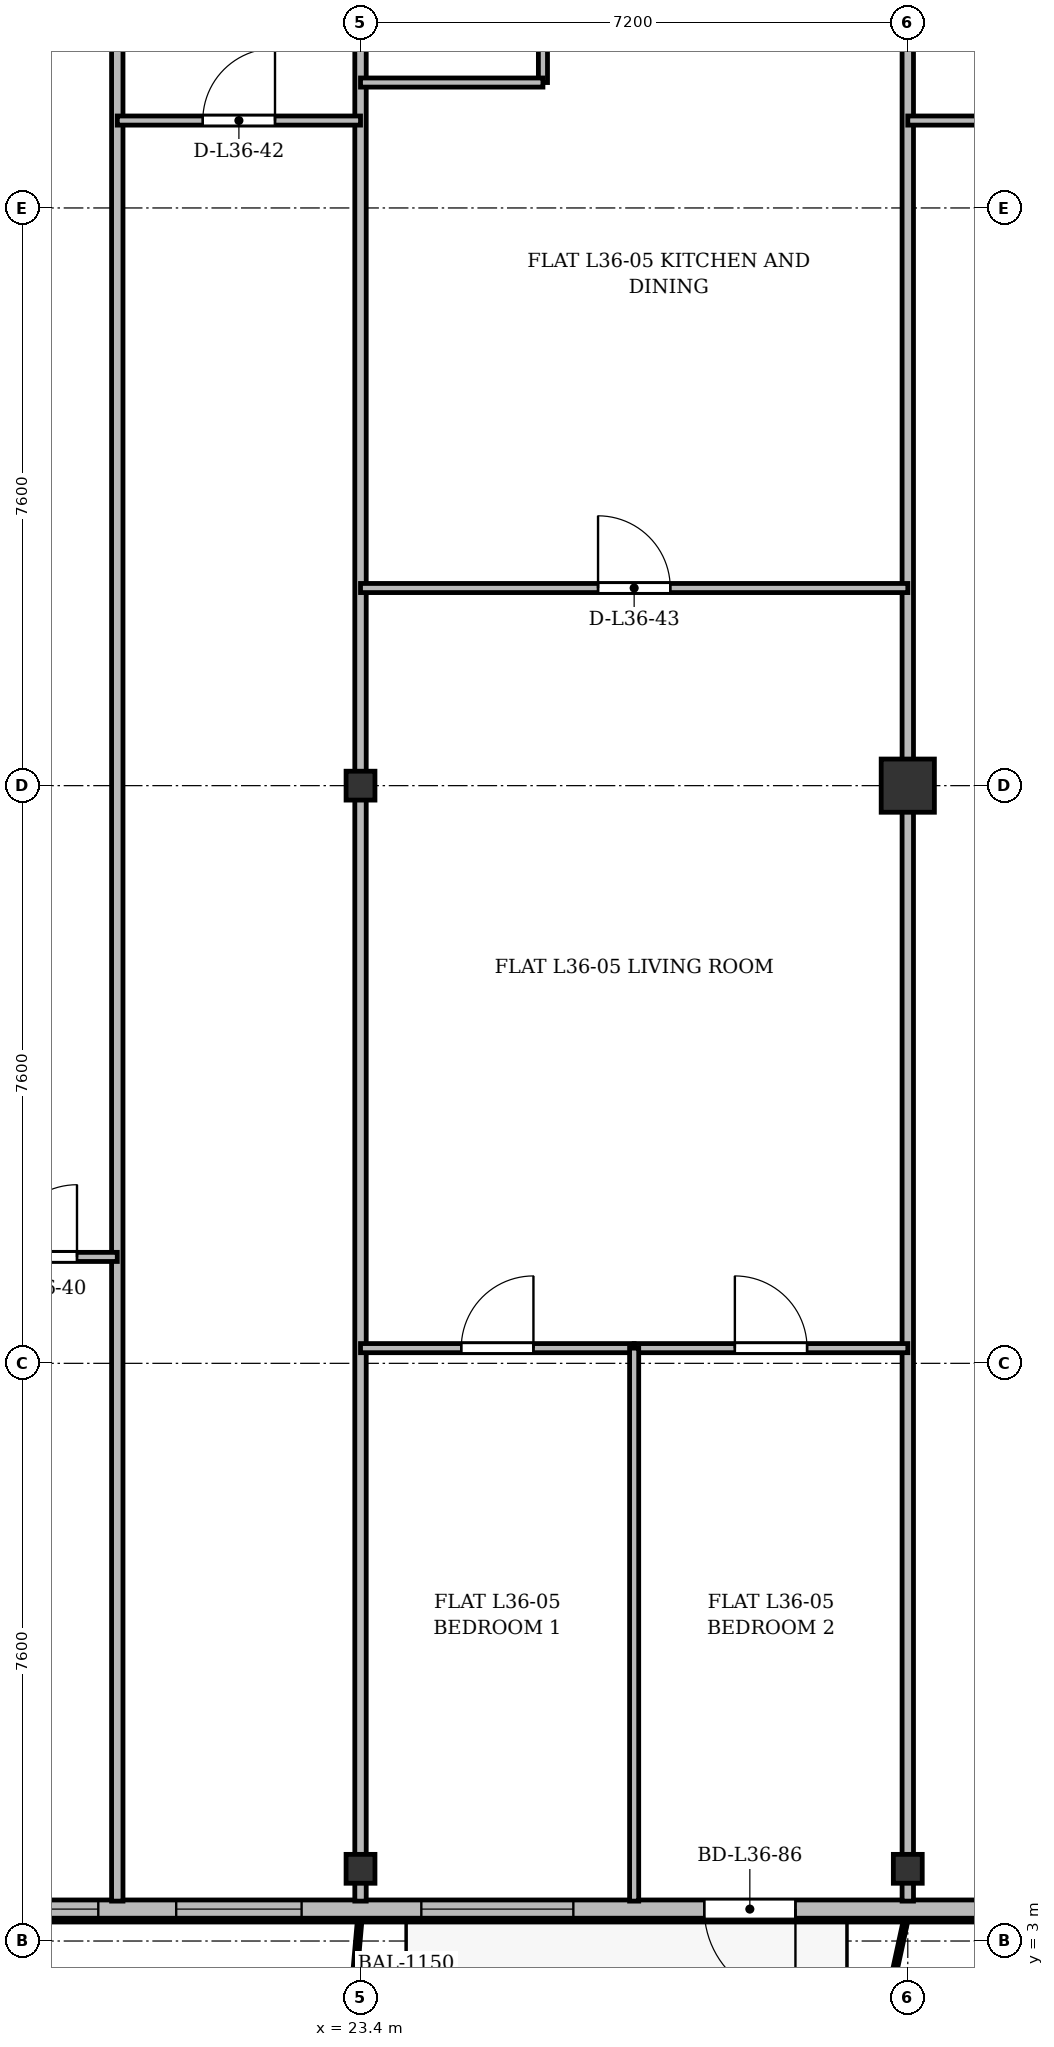
"""IFC4 building model, lengths in metres.
Left out: names, types, materials, properties, quantities, classifications, styles, units other than length and angle.
Written with IfcOpenShell. Run it as: python <this file> out.ifc"""

import sys

from ifc_helpers import new_model, si_unit, direction, frame, frame_2d, origin, origin_2d, place, context, subcontext, project, spatial, rectangle, i_section, extrude, source, transform, mapped, element, fill, save


model = new_model("IFC4")
c1 = context("Model", 3, precision=1e-05, world=origin(), true_north=direction((0.0, 1.0)))
c2 = subcontext(c1, "Body", "Model", "MODEL_VIEW")
j1 = project(units=[si_unit("LENGTHUNIT", "METRE"), si_unit("PLANEANGLEUNIT", "RADIAN")], contexts=[c1])
p1 = place(None, origin())
s1 = spatial("IfcSite", under=j1, at=p1, CompositionType="ELEMENT")
p2 = place(p1, origin())
s2 = spatial("IfcBuilding", under=s1, at=p2, CompositionType="ELEMENT")
p3 = place(p2, frame((0.0, 0.0, 139.3)))
s3 = spatial("IfcBuildingStorey", under=s2, at=p3, CompositionType="ELEMENT", Elevation=139.3)
m1 = source(origin(), c2, "Body", "SweptSolid", [
    extrude(i_section(OverallWidth=0.38, OverallDepth=0.38, WebThickness=0.02, FlangeThickness=0.03, at=origin_2d()), origin(), (0.0, 0.0, 1.0), 3.6),
])
for number, where, z_axis, x_axis in (
    (1, (23.4, 3.95, 0.0), (0.0, 0.0, 1.0), (1.0, 0.0, 0.0)),
    (2, (23.4, 18.2, 0.0), (0.0, 0.0, 1.0), (1.0, 0.0, 0.0)),
    (3, (30.6, 3.95, 0.0), (0.0, 0.0, 1.0), (1.0, 0.0, 0.0)),
):
    element("IfcColumn", number, at=place(p3, frame(where, z_axis=z_axis, x_axis=x_axis)), inside=s3, PredefinedType="COLUMN", context=c2, shape_type="MappedRepresentation", body=[
        mapped(m1, transform((0.0, 0.0, 0.0), x_axis=(1.0, 0.0, 0.0), y_axis=(0.0, 1.0, 0.0), z_axis=(0.0, 0.0, 1.0), scale=1.0)),
    ])
m2 = source(origin(), c2, "Body", "SweptSolid", [
    extrude(rectangle(XDim=0.7, YDim=0.7, at=origin_2d()), origin(), (0.0, 0.0, 1.0), 3.6),
])
p4 = place(p3, frame((30.6, 18.2, 0.0), z_axis=(0.0, 0.0, 1.0), x_axis=(1.0, 0.0, 0.0)))
e4 = element("IfcColumn", 4, at=p4, inside=s3, PredefinedType="COLUMN", context=c2, shape_type="MappedRepresentation", body=[
    mapped(m2, transform((0.0, 0.0, 0.0), x_axis=(1.0, 0.0, 0.0), y_axis=(0.0, 1.0, 0.0), z_axis=(0.0, 0.0, 1.0), scale=1.0)),
])
p5 = place(p3, frame((63.6, 3.42, 0.0), z_axis=(0.0, 0.0, 1.0), x_axis=(-1.0, 0.0, 0.0)))
e5 = element("IfcWall", 5, at=p5, inside=s3, PredefinedType="SOLIDWALL", context=c2, shape_type="SweptSolid", body=[
    extrude(rectangle(XDim=52.8, YDim=0.24, at=frame_2d((26.4, 0.0))), origin(), (0.0, 0.0, 1.0), 3.35),
])
p6 = place(p5, frame((0.495, 0.0, 0.9)))
e6 = element("IfcOpeningElement", 6, at=p6, cuts=e5, PredefinedType="OPENING", context=c2, shape_type="SweptSolid", body=[
    extrude(rectangle(XDim=1.5, YDim=1.75, at=frame_2d((0.75, 0.875))), frame((0.0, 0.13, 0.0), z_axis=(0.0, -1.0, 0.0), x_axis=(1.0, 0.0, 0.0)), (0.0, 0.0, 1.0), 0.26),
])
p7 = place(p5, frame((2.9, 0.0, 0.9)))
e7 = element("IfcOpeningElement", 7, at=p7, cuts=e5, PredefinedType="OPENING", context=c2, shape_type="SweptSolid", body=[
    extrude(rectangle(XDim=1.5, YDim=1.75, at=frame_2d((0.75, 0.875))), frame((0.0, 0.13, 0.0), z_axis=(0.0, -1.0, 0.0), x_axis=(1.0, 0.0, 0.0)), (0.0, 0.0, 1.0), 0.26),
])
p8 = place(p5, frame((5.902, 0.0, 0.0)))
e8 = element("IfcOpeningElement", 8, at=p8, cuts=e5, PredefinedType="OPENING", context=c2, shape_type="SweptSolid", body=[
    extrude(rectangle(XDim=1.2, YDim=2.2, at=frame_2d((0.6, 1.1))), frame((0.0, 0.13, 0.0), z_axis=(0.0, -1.0, 0.0), x_axis=(1.0, 0.0, 0.0)), (0.0, 0.0, 1.0), 0.26),
])
p9 = place(p5, frame((7.65, 0.0, 0.9)))
e9 = element("IfcOpeningElement", 9, at=p9, cuts=e5, PredefinedType="OPENING", context=c2, shape_type="SweptSolid", body=[
    extrude(rectangle(XDim=1.5, YDim=1.75, at=frame_2d((0.75, 0.875))), frame((0.0, 0.13, 0.0), z_axis=(0.0, -1.0, 0.0), x_axis=(1.0, 0.0, 0.0)), (0.0, 0.0, 1.0), 0.26),
])
p10 = place(p5, frame((10.1, 0.0, 0.9)))
e10 = element("IfcOpeningElement", 10, at=p10, cuts=e5, PredefinedType="OPENING", context=c2, shape_type="SweptSolid", body=[
    extrude(rectangle(XDim=1.8, YDim=1.8, at=frame_2d((0.9, 0.9))), frame((0.0, 0.13, 0.0), z_axis=(0.0, -1.0, 0.0), x_axis=(1.0, 0.0, 0.0)), (0.0, 0.0, 1.0), 0.26),
])
p11 = place(p5, frame((13.05, 0.0, 0.9)))
e11 = element("IfcOpeningElement", 11, at=p11, cuts=e5, PredefinedType="OPENING", context=c2, shape_type="SweptSolid", body=[
    extrude(rectangle(XDim=1.5, YDim=1.75, at=frame_2d((0.75, 0.875))), frame((0.0, 0.13, 0.0), z_axis=(0.0, -1.0, 0.0), x_axis=(1.0, 0.0, 0.0)), (0.0, 0.0, 1.0), 0.26),
])
p12 = place(p5, frame((15.45, 0.0, 0.9)))
e12 = element("IfcOpeningElement", 12, at=p12, cuts=e5, PredefinedType="OPENING", context=c2, shape_type="SweptSolid", body=[
    extrude(rectangle(XDim=1.5, YDim=1.75, at=frame_2d((0.75, 0.875))), frame((0.0, 0.13, 0.0), z_axis=(0.0, -1.0, 0.0), x_axis=(1.0, 0.0, 0.0)), (0.0, 0.0, 1.0), 0.26),
])
p13 = place(p5, frame((17.6, 0.0, 0.9)))
e13 = element("IfcOpeningElement", 13, at=p13, cuts=e5, PredefinedType="OPENING", context=c2, shape_type="SweptSolid", body=[
    extrude(rectangle(XDim=2.0, YDim=1.95, at=frame_2d((1.0, 0.975))), frame((0.0, 0.13, 0.0), z_axis=(0.0, -1.0, 0.0), x_axis=(1.0, 0.0, 0.0)), (0.0, 0.0, 1.0), 0.26),
])
p14 = place(p5, frame((20.625, 0.0, 0.9)))
e14 = element("IfcOpeningElement", 14, at=p14, cuts=e5, PredefinedType="OPENING", context=c2, shape_type="SweptSolid", body=[
    extrude(rectangle(XDim=1.65, YDim=1.85, at=frame_2d((0.825, 0.925))), frame((0.0, 0.13, 0.0), z_axis=(0.0, -1.0, 0.0), x_axis=(1.0, 0.0, 0.0)), (0.0, 0.0, 1.0), 0.26),
])
p15 = place(p5, frame((23.85, 0.0, 0.9)))
e15 = element("IfcOpeningElement", 15, at=p15, cuts=e5, PredefinedType="OPENING", context=c2, shape_type="SweptSolid", body=[
    extrude(rectangle(XDim=1.8, YDim=1.8, at=frame_2d((0.9, 0.9))), frame((0.0, 0.13, 0.0), z_axis=(0.0, -1.0, 0.0), x_axis=(1.0, 0.0, 0.0)), (0.0, 0.0, 1.0), 0.26),
])
p16 = place(p5, frame((28.6, 0.0, 0.9)))
e16 = element("IfcOpeningElement", 16, at=p16, cuts=e5, PredefinedType="OPENING", context=c2, shape_type="SweptSolid", body=[
    extrude(rectangle(XDim=2.2, YDim=1.8, at=frame_2d((1.1, 0.9))), frame((0.0, 0.13, 0.0), z_axis=(0.0, -1.0, 0.0), x_axis=(1.0, 0.0, 0.0)), (0.0, 0.0, 1.0), 0.26),
])
p17 = place(p5, frame((34.478, 0.0, 0.0)))
e17 = element("IfcOpeningElement", 17, at=p17, cuts=e5, PredefinedType="OPENING", context=c2, shape_type="SweptSolid", body=[
    extrude(rectangle(XDim=1.2, YDim=2.2, at=frame_2d((0.6, 1.1))), frame((0.0, 0.13, 0.0), z_axis=(0.0, -1.0, 0.0), x_axis=(1.0, 0.0, 0.0)), (0.0, 0.0, 1.0), 0.26),
])
p18 = place(p5, frame((37.4, 0.0, 0.9)))
e18 = element("IfcOpeningElement", 18, at=p18, cuts=e5, PredefinedType="OPENING", context=c2, shape_type="SweptSolid", body=[
    extrude(rectangle(XDim=2.0, YDim=1.95, at=frame_2d((1.0, 0.975))), frame((0.0, 0.13, 0.0), z_axis=(0.0, -1.0, 0.0), x_axis=(1.0, 0.0, 0.0)), (0.0, 0.0, 1.0), 0.26),
])
p19 = place(p5, frame((40.975, 0.0, 0.9)))
e19 = element("IfcOpeningElement", 19, at=p19, cuts=e5, PredefinedType="OPENING", context=c2, shape_type="SweptSolid", body=[
    extrude(rectangle(XDim=1.65, YDim=1.85, at=frame_2d((0.825, 0.925))), frame((0.0, 0.13, 0.0), z_axis=(0.0, -1.0, 0.0), x_axis=(1.0, 0.0, 0.0)), (0.0, 0.0, 1.0), 0.26),
])
p20 = place(p5, frame((43.65, 0.0, 0.9)))
e20 = element("IfcOpeningElement", 20, at=p20, cuts=e5, PredefinedType="OPENING", context=c2, shape_type="SweptSolid", body=[
    extrude(rectangle(XDim=1.5, YDim=1.75, at=frame_2d((0.75, 0.875))), frame((0.0, 0.13, 0.0), z_axis=(0.0, -1.0, 0.0), x_axis=(1.0, 0.0, 0.0)), (0.0, 0.0, 1.0), 0.26),
])
p21 = place(p5, frame((45.85, 0.0, 0.9)))
e21 = element("IfcOpeningElement", 21, at=p21, cuts=e5, PredefinedType="OPENING", context=c2, shape_type="SweptSolid", body=[
    extrude(rectangle(XDim=1.5, YDim=1.75, at=frame_2d((0.75, 0.875))), frame((0.0, 0.13, 0.0), z_axis=(0.0, -1.0, 0.0), x_axis=(1.0, 0.0, 0.0)), (0.0, 0.0, 1.0), 0.26),
])
p22 = place(p5, frame((48.25, 0.0, 0.9)))
e22 = element("IfcOpeningElement", 22, at=p22, cuts=e5, PredefinedType="OPENING", context=c2, shape_type="SweptSolid", body=[
    extrude(rectangle(XDim=1.5, YDim=1.75, at=frame_2d((0.75, 0.875))), frame((0.0, 0.13, 0.0), z_axis=(0.0, -1.0, 0.0), x_axis=(1.0, 0.0, 0.0)), (0.0, 0.0, 1.0), 0.26),
])
p23 = place(p5, frame((50.455, 0.0, 0.9)))
e23 = element("IfcOpeningElement", 23, at=p23, cuts=e5, PredefinedType="OPENING", context=c2, shape_type="SweptSolid", body=[
    extrude(rectangle(XDim=2.0, YDim=1.95, at=frame_2d((1.0, 0.975))), frame((0.0, 0.13, 0.0), z_axis=(0.0, -1.0, 0.0), x_axis=(1.0, 0.0, 0.0)), (0.0, 0.0, 1.0), 0.26),
])
for number, where, z_axis, x_axis in (
    (24, (23.4, 3.525, 0.0), (0.0, 0.0, 1.0), (0.0, 1.0, 0.0)),
    (25, (30.6, 3.525, 0.0), (0.0, 0.0, 1.0), (0.0, 1.0, 0.0)),
):
    element("IfcWall", number, at=place(p3, frame(where, z_axis=z_axis, x_axis=x_axis)), inside=s3, PredefinedType="PARTITIONING", context=c2, shape_type="SweptSolid", body=[
        extrude(rectangle(XDim=27.275, YDim=0.15, at=frame_2d((13.638, 0.0))), origin(), (0.0, 0.0, 1.0), 2.85),
    ])
p24 = place(p3, frame((20.2, 3.525, 0.0), z_axis=(0.0, 0.0, 1.0), x_axis=(0.0, 1.0, 0.0)))
e26 = element("IfcWall", 26, at=p24, inside=s3, PredefinedType="PARTITIONING", context=c2, shape_type="SweptSolid", body=[
    extrude(rectangle(XDim=27.275, YDim=0.15, at=frame_2d((13.638, 0.0))), origin(), (0.0, 0.0, 1.0), 2.75),
])
p25 = place(p3, frame((18.2, 12.0, 0.0), z_axis=(0.0, 0.0, 1.0), x_axis=(1.0, 0.0, 0.0)))
e27 = element("IfcWall", 27, at=p25, inside=s3, PredefinedType="PARTITIONING", context=c2, shape_type="SweptSolid", body=[
    extrude(rectangle(XDim=2.0, YDim=0.12, at=frame_2d((1.0, 0.0))), origin(), (0.0, 0.0, 1.0), 3.35),
])
p26 = place(p25, frame((0.52, 0.0, 0.0)))
e28 = element("IfcOpeningElement", 28, at=p26, cuts=e27, PredefinedType="OPENING", context=c2, shape_type="SweptSolid", body=[
    extrude(rectangle(XDim=0.95, YDim=2.15, at=frame_2d((0.475, 1.075))), frame((0.0, 0.07, 0.0), z_axis=(0.0, -1.0, 0.0), x_axis=(1.0, 0.0, 0.0)), (0.0, 0.0, 1.0), 0.14),
])
p27 = place(p3, frame((20.2, 26.95, 0.0), z_axis=(0.0, 0.0, 1.0), x_axis=(1.0, 0.0, 0.0)))
e29 = element("IfcWall", 29, at=p27, inside=s3, PredefinedType="PARTITIONING", context=c2, shape_type="SweptSolid", body=[
    extrude(rectangle(XDim=3.2, YDim=0.12, at=frame_2d((1.6, 0.0))), origin(), (0.0, 0.0, 1.0), 2.85),
])
p28 = place(p27, frame((1.125, 0.0, 0.0)))
e30 = element("IfcOpeningElement", 30, at=p28, cuts=e29, PredefinedType="OPENING", context=c2, shape_type="SweptSolid", body=[
    extrude(rectangle(XDim=0.95, YDim=2.15, at=frame_2d((0.475, 1.075))), frame((0.0, 0.07, 0.0), z_axis=(0.0, -1.0, 0.0), x_axis=(1.0, 0.0, 0.0)), (0.0, 0.0, 1.0), 0.14),
])
p29 = place(p3, frame((23.4, 20.8, 0.0), z_axis=(0.0, 0.0, 1.0), x_axis=(1.0, 0.0, 0.0)))
e31 = element("IfcWall", 31, at=p29, inside=s3, PredefinedType="PARTITIONING", context=c2, shape_type="SweptSolid", body=[
    extrude(rectangle(XDim=7.2, YDim=0.12, at=frame_2d((3.6, 0.0))), origin(), (0.0, 0.0, 1.0), 2.85),
])
p30 = place(p29, frame((3.125, 0.0, 0.0)))
e32 = element("IfcOpeningElement", 32, at=p30, cuts=e31, PredefinedType="OPENING", context=c2, shape_type="SweptSolid", body=[
    extrude(rectangle(XDim=0.95, YDim=2.15, at=frame_2d((0.475, 1.075))), frame((0.0, 0.07, 0.0), z_axis=(0.0, -1.0, 0.0), x_axis=(1.0, 0.0, 0.0)), (0.0, 0.0, 1.0), 0.14),
])
p31 = place(p3, frame((25.8, 27.45, 0.0), z_axis=(0.0, 0.0, 1.0), x_axis=(0.0, 1.0, 0.0)))
e33 = element("IfcWall", 33, at=p31, inside=s3, PredefinedType="PARTITIONING", context=c2, shape_type="SweptSolid", body=[
    extrude(rectangle(XDim=3.35, YDim=0.12, at=frame_2d((1.675, 0.0))), origin(), (0.0, 0.0, 1.0), 3.35),
])
p32 = place(p31, frame((0.8, 0.0, 0.0)))
e34 = element("IfcOpeningElement", 34, at=p32, cuts=e33, PredefinedType="OPENING", context=c2, shape_type="SweptSolid", body=[
    extrude(rectangle(XDim=0.85, YDim=2.1, at=frame_2d((0.425, 1.05))), frame((0.0, 0.07, 0.0), z_axis=(0.0, -1.0, 0.0), x_axis=(1.0, 0.0, 0.0)), (0.0, 0.0, 1.0), 0.14),
])
p33 = place(p3, frame((23.4, 27.45, 0.0), z_axis=(0.0, 0.0, 1.0), x_axis=(1.0, 0.0, 0.0)))
e35 = element("IfcWall", 35, at=p33, inside=s3, PredefinedType="PARTITIONING", context=c2, shape_type="SweptSolid", body=[
    extrude(rectangle(XDim=2.4, YDim=0.12, at=frame_2d((1.2, 0.0))), origin(), (0.0, 0.0, 1.0), 2.85),
])
p34 = place(p3, frame((23.4, 10.8, 0.0), z_axis=(0.0, 0.0, 1.0), x_axis=(1.0, 0.0, 0.0)))
e36 = element("IfcWall", 36, at=p34, inside=s3, PredefinedType="PARTITIONING", context=c2, shape_type="SweptSolid", body=[
    extrude(rectangle(XDim=3.6, YDim=0.12, at=frame_2d((1.8, 0.0))), origin(), (0.0, 0.0, 1.0), 2.85),
])
p35 = place(p34, frame((1.325, 0.0, 0.0)))
e37 = element("IfcOpeningElement", 37, at=p35, cuts=e36, PredefinedType="OPENING", context=c2, shape_type="SweptSolid", body=[
    extrude(rectangle(XDim=0.95, YDim=2.15, at=frame_2d((0.475, 1.075))), frame((0.0, 0.07, 0.0), z_axis=(0.0, -1.0, 0.0), x_axis=(1.0, 0.0, 0.0)), (0.0, 0.0, 1.0), 0.14),
])
p36 = place(p3, frame((27.0, 10.8, 0.0), z_axis=(0.0, 0.0, 1.0), x_axis=(1.0, 0.0, 0.0)))
e38 = element("IfcWall", 38, at=p36, inside=s3, PredefinedType="PARTITIONING", context=c2, shape_type="SweptSolid", body=[
    extrude(rectangle(XDim=3.6, YDim=0.12, at=frame_2d((1.8, 0.0))), origin(), (0.0, 0.0, 1.0), 2.85),
])
p37 = place(p36, frame((1.325, 0.0, 0.0)))
e39 = element("IfcOpeningElement", 39, at=p37, cuts=e38, PredefinedType="OPENING", context=c2, shape_type="SweptSolid", body=[
    extrude(rectangle(XDim=0.95, YDim=2.15, at=frame_2d((0.475, 1.075))), frame((0.0, 0.07, 0.0), z_axis=(0.0, -1.0, 0.0), x_axis=(1.0, 0.0, 0.0)), (0.0, 0.0, 1.0), 0.14),
])
p38 = place(p3, frame((27.0, 3.525, 0.0), z_axis=(0.0, 0.0, 1.0), x_axis=(0.0, 1.0, 0.0)))
e40 = element("IfcWall", 40, at=p38, inside=s3, PredefinedType="PARTITIONING", context=c2, shape_type="SweptSolid", body=[
    extrude(rectangle(XDim=7.275, YDim=0.12, at=frame_2d((3.638, 0.0))), origin(), (0.0, 0.0, 1.0), 2.75),
])
p39 = place(p3, frame((30.6, 26.95, 0.0), z_axis=(0.0, 0.0, 1.0), x_axis=(1.0, 0.0, 0.0)))
e41 = element("IfcWall", 41, at=p39, inside=s3, PredefinedType="PARTITIONING", context=c2, shape_type="SweptSolid", body=[
    extrude(rectangle(XDim=6.6, YDim=0.12, at=frame_2d((3.3, 0.0))), origin(), (0.0, 0.0, 1.0), 2.85),
])
p40 = place(p39, frame((2.734, 0.0, 0.0)))
e42 = element("IfcOpeningElement", 42, at=p40, cuts=e41, PredefinedType="OPENING", context=c2, shape_type="SweptSolid", body=[
    extrude(rectangle(XDim=0.95, YDim=2.15, at=frame_2d((0.475, 1.075))), frame((0.0, 0.07, 0.0), z_axis=(0.0, -1.0, 0.0), x_axis=(1.0, 0.0, 0.0)), (0.0, 0.0, 1.0), 0.14),
])
m3 = source(origin(), c2, "Body", "SweptSolid", [
    extrude(rectangle(XDim=1.2, YDim=2.2, at=frame_2d((0.6, 1.1))), frame((0.0, 0.025, 0.0), z_axis=(0.0, -1.0, 0.0), x_axis=(1.0, 0.0, 0.0)), (0.0, 0.0, 1.0), 0.05),
])
p41 = place(p17, origin())
e43 = element("IfcDoor", 43, at=p41, inside=s3, OperationType="SINGLE_SWING_LEFT", PredefinedType="DOOR", context=c2, shape_type="MappedRepresentation", body=[
    mapped(m3, transform((0.0, 0.0, 0.0), x_axis=(1.0, 0.0, 0.0), y_axis=(0.0, 1.0, 0.0), z_axis=(0.0, 0.0, 1.0), scale=1.0)),
])
fill(e17, e43)
m4 = source(origin(), c2, "Body", "SweptSolid", [
    extrude(rectangle(XDim=2.0, YDim=1.95, at=frame_2d((1.0, 0.975))), frame((0.0, 0.03, 0.0), z_axis=(0.0, -1.0, 0.0), x_axis=(1.0, 0.0, 0.0)), (0.0, 0.0, 1.0), 0.06),
])
p42 = place(p18, origin())
e44 = element("IfcWindow", 44, at=p42, inside=s3, PartitioningType="SINGLE_PANEL", PredefinedType="WINDOW", context=c2, shape_type="MappedRepresentation", body=[
    mapped(m4, transform((0.0, 0.0, 0.0), x_axis=(1.0, 0.0, 0.0), y_axis=(0.0, 1.0, 0.0), z_axis=(0.0, 0.0, 1.0), scale=1.0)),
])
fill(e18, e44)
m5 = source(origin(), c2, "Body", "SweptSolid", [
    extrude(rectangle(XDim=1.65, YDim=1.85, at=frame_2d((0.825, 0.925))), frame((0.0, 0.03, 0.0), z_axis=(0.0, -1.0, 0.0), x_axis=(1.0, 0.0, 0.0)), (0.0, 0.0, 1.0), 0.06),
])
p43 = place(p19, origin())
e45 = element("IfcWindow", 45, at=p43, inside=s3, PartitioningType="SINGLE_PANEL", PredefinedType="WINDOW", context=c2, shape_type="MappedRepresentation", body=[
    mapped(m5, transform((0.0, 0.0, 0.0), x_axis=(1.0, 0.0, 0.0), y_axis=(0.0, 1.0, 0.0), z_axis=(0.0, 0.0, 1.0), scale=1.0)),
])
fill(e19, e45)
m6 = source(origin(), c2, "Body", "SweptSolid", [
    extrude(rectangle(XDim=1.5, YDim=1.75, at=frame_2d((0.75, 0.875))), frame((0.0, 0.03, 0.0), z_axis=(0.0, -1.0, 0.0), x_axis=(1.0, 0.0, 0.0)), (0.0, 0.0, 1.0), 0.06),
])
p44 = place(p20, origin())
e46 = element("IfcWindow", 46, at=p44, inside=s3, PartitioningType="SINGLE_PANEL", PredefinedType="WINDOW", context=c2, shape_type="MappedRepresentation", body=[
    mapped(m6, transform((0.0, 0.0, 0.0), x_axis=(1.0, 0.0, 0.0), y_axis=(0.0, 1.0, 0.0), z_axis=(0.0, 0.0, 1.0), scale=1.0)),
])
fill(e20, e46)
m7 = source(origin(), c2, "Body", "SweptSolid", [
    extrude(rectangle(XDim=0.95, YDim=2.15, at=frame_2d((0.475, 1.075))), frame((0.0, 0.025, 0.0), z_axis=(0.0, -1.0, 0.0), x_axis=(1.0, 0.0, 0.0)), (0.0, 0.0, 1.0), 0.05),
])
p45 = place(p26, origin())
e47 = element("IfcDoor", 47, at=p45, inside=s3, OperationType="SINGLE_SWING_RIGHT", PredefinedType="DOOR", context=c2, shape_type="MappedRepresentation", body=[
    mapped(m7, transform((0.0, 0.0, 0.0), x_axis=(1.0, 0.0, 0.0), y_axis=(0.0, 1.0, 0.0), z_axis=(0.0, 0.0, 1.0), scale=1.0)),
])
fill(e28, e47)
p46 = place(p28, origin())
e48 = element("IfcDoor", 48, at=p46, inside=s3, OperationType="SINGLE_SWING_RIGHT", PredefinedType="DOOR", context=c2, shape_type="MappedRepresentation", body=[
    mapped(m7, transform((0.0, 0.0, 0.0), x_axis=(1.0, 0.0, 0.0), y_axis=(0.0, 1.0, 0.0), z_axis=(0.0, 0.0, 1.0), scale=1.0)),
])
fill(e30, e48)
p47 = place(p30, origin())
e49 = element("IfcDoor", 49, at=p47, inside=s3, OperationType="SINGLE_SWING_LEFT", PredefinedType="DOOR", context=c2, shape_type="MappedRepresentation", body=[
    mapped(m7, transform((0.0, 0.0, 0.0), x_axis=(1.0, 0.0, 0.0), y_axis=(0.0, 1.0, 0.0), z_axis=(0.0, 0.0, 1.0), scale=1.0)),
])
fill(e32, e49)
p48 = place(p35, origin())
e50 = element("IfcDoor", 50, at=p48, inside=s3, OperationType="SINGLE_SWING_RIGHT", PredefinedType="DOOR", context=c2, shape_type="MappedRepresentation", body=[
    mapped(m7, transform((0.0, 0.0, 0.0), x_axis=(1.0, 0.0, 0.0), y_axis=(0.0, 1.0, 0.0), z_axis=(0.0, 0.0, 1.0), scale=1.0)),
])
fill(e37, e50)
p49 = place(p37, origin())
e51 = element("IfcDoor", 51, at=p49, inside=s3, OperationType="SINGLE_SWING_LEFT", PredefinedType="DOOR", context=c2, shape_type="MappedRepresentation", body=[
    mapped(m7, transform((0.0, 0.0, 0.0), x_axis=(1.0, 0.0, 0.0), y_axis=(0.0, 1.0, 0.0), z_axis=(0.0, 0.0, 1.0), scale=1.0)),
])
fill(e39, e51)
save(model, sys.argv[1])
